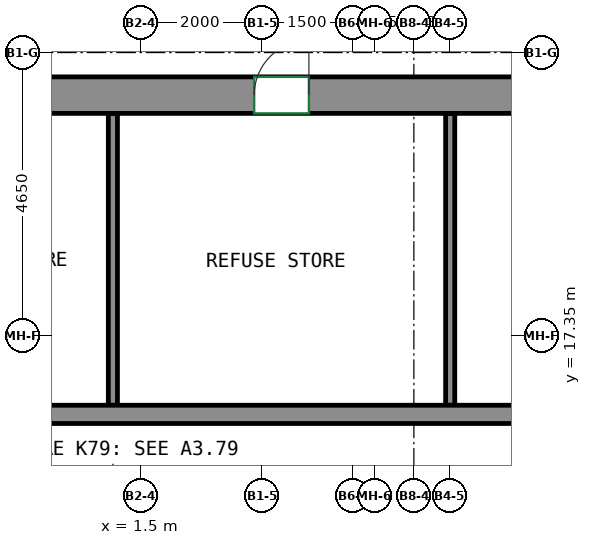
"""IFC4 building model, lengths in metres.
Left out: names, types, materials, properties, quantities, classifications, styles, units other than length and angle.
Written with IfcOpenShell. Run it as: python <this file> out.ifc"""

import sys

from ifc_helpers import new_model, si_unit, direction, frame, frame_2d, origin, place, context, subcontext, project, spatial, rectangle, extrude, source, transform, mapped, element, fill, save


model = new_model("IFC4")
c1 = context("Model", 3, precision=1e-05, world=origin(), true_north=direction((0.0, 1.0)))
c2 = subcontext(c1, "Body", "Model", "MODEL_VIEW")
j1 = project(units=[si_unit("LENGTHUNIT", "METRE"), si_unit("PLANEANGLEUNIT", "RADIAN")], contexts=[c1])
p1 = place(None, origin())
s1 = spatial("IfcSite", under=j1, at=p1, CompositionType="ELEMENT")
p2 = place(p1, origin())
s2 = spatial("IfcBuilding", under=s1, at=p2, CompositionType="ELEMENT")
p3 = place(p2, frame((0.0, 0.0, 312.0)))
s3 = spatial("IfcBuildingStorey", under=s2, at=p3, CompositionType="ELEMENT", Elevation=312.0)
m1 = source(origin(), c2, "Body", "SweptSolid", [
    extrude(rectangle(XDim=33.3, YDim=0.6, at=frame_2d((16.65, 0.0))), origin(), (0.0, 0.0, 1.0), 3.12),
])
p4 = place(p3, frame((-15.6, 21.3, 0.0), z_axis=(0.0, 0.0, 1.0), x_axis=(1.0, 0.0, 0.0)))
e1 = element("IfcWall", 1, at=p4, inside=s3, PredefinedType="SHEAR", context=c2, shape_type="MappedRepresentation", body=[
    mapped(m1, transform((0.0, 0.0, 0.0))),
])
p5 = place(p4, frame((8.12, 0.0, 0.0)))
e2 = element("IfcOpeningElement", 2, at=p5, cuts=e1, PredefinedType="OPENING", context=c2, shape_type="SweptSolid", body=[
    extrude(rectangle(XDim=0.9, YDim=2.1, at=frame_2d((0.45, 1.05))), frame((0.0, 0.31, 0.0), z_axis=(0.0, -1.0, 0.0), x_axis=(1.0, 0.0, 0.0)), (0.0, 0.0, 1.0), 0.62),
])
p6 = place(p4, frame((14.15, 0.0, 0.0)))
e3 = element("IfcOpeningElement", 3, at=p6, cuts=e1, PredefinedType="OPENING", context=c2, shape_type="SweptSolid", body=[
    extrude(rectangle(XDim=0.9, YDim=2.1, at=frame_2d((0.45, 1.05))), frame((0.0, 0.31, 0.0), z_axis=(0.0, -1.0, 0.0), x_axis=(1.0, 0.0, 0.0)), (0.0, 0.0, 1.0), 0.62),
])
p7 = place(p4, frame((18.974, 0.0, 0.0)))
e4 = element("IfcOpeningElement", 4, at=p7, cuts=e1, PredefinedType="OPENING", context=c2, shape_type="SweptSolid", body=[
    extrude(rectangle(XDim=0.9, YDim=2.1, at=frame_2d((0.45, 1.05))), frame((0.0, 0.31, 0.0), z_axis=(0.0, -1.0, 0.0), x_axis=(1.0, 0.0, 0.0)), (0.0, 0.0, 1.0), 0.62),
])
p8 = place(p4, frame((23.664, 0.0, 0.0)))
e5 = element("IfcOpeningElement", 5, at=p8, cuts=e1, PredefinedType="OPENING", context=c2, shape_type="SweptSolid", body=[
    extrude(rectangle(XDim=0.9, YDim=2.1, at=frame_2d((0.45, 1.05))), frame((0.0, 0.31, 0.0), z_axis=(0.0, -1.0, 0.0), x_axis=(1.0, 0.0, 0.0)), (0.0, 0.0, 1.0), 0.62),
])
p9 = place(p4, frame((26.92, 0.0, 0.0)))
e6 = element("IfcOpeningElement", 6, at=p9, cuts=e1, PredefinedType="OPENING", context=c2, shape_type="SweptSolid", body=[
    extrude(rectangle(XDim=0.9, YDim=2.1, at=frame_2d((0.45, 1.05))), frame((0.0, 0.31, 0.0), z_axis=(0.0, -1.0, 0.0), x_axis=(1.0, 0.0, 0.0)), (0.0, 0.0, 1.0), 0.62),
])
p10 = place(p4, frame((2.125, 0.0, 0.0)))
e7 = element("IfcOpeningElement", 7, at=p10, cuts=e1, PredefinedType="OPENING", context=c2, shape_type="SweptSolid", body=[
    extrude(rectangle(XDim=0.9, YDim=2.1, at=frame_2d((0.45, 1.05))), frame((0.0, 0.31, 0.0), z_axis=(0.0, -1.0, 0.0), x_axis=(1.0, 0.0, 0.0)), (0.0, 0.0, 1.0), 0.62),
])
p11 = place(p4, frame((30.275, 0.0, 0.0)))
e8 = element("IfcOpeningElement", 8, at=p11, cuts=e1, PredefinedType="OPENING", context=c2, shape_type="SweptSolid", body=[
    extrude(rectangle(XDim=0.9, YDim=2.1, at=frame_2d((0.45, 1.05))), frame((0.0, 0.31, 0.0), z_axis=(0.0, -1.0, 0.0), x_axis=(1.0, 0.0, 0.0)), (0.0, 0.0, 1.0), 0.62),
])
m2 = source(origin(), c2, "Body", "SweptSolid", [
    extrude(rectangle(XDim=22.08, YDim=0.3, at=frame_2d((11.04, 0.0))), origin(), (0.0, 0.0, 1.0), 3.12),
])
p12 = place(p3, frame((-11.01, 16.05, 0.0), z_axis=(0.0, 0.0, 1.0), x_axis=(1.0, 0.0, 0.0)))
e9 = element("IfcWall", 9, at=p12, inside=s3, PredefinedType="SHEAR", context=c2, shape_type="MappedRepresentation", body=[
    mapped(m2, transform((0.0, 0.0, 0.0))),
])
m3 = source(origin(), c2, "Body", "SweptSolid", [
    extrude(rectangle(XDim=4.8, YDim=0.15, at=frame_2d((2.4, 0.0))), origin(), (0.0, 0.0, 1.0), 3.12),
])
for number, where, z_axis, x_axis in (
    (10, (1.05, 16.2, 0.0), (0.0, 0.0, 1.0), (0.0, 1.0, 0.0)),
    (11, (6.598, 16.2, 0.0), (0.0, 0.0, 1.0), (0.0, 1.0, 0.0)),
):
    element("IfcWall", number, at=place(p3, frame(where, z_axis=z_axis, x_axis=x_axis)), inside=s3, PredefinedType="PARTITIONING", context=c2, shape_type="MappedRepresentation", body=[
        mapped(m3, transform((0.0, 0.0, 0.0))),
    ])
p13 = place(p7, origin())
e12 = element("IfcDoor", 12, at=p13, inside=s3, OperationType="SINGLE_SWING_RIGHT", PredefinedType="DOOR", context=c2, shape_type="SweptSolid", body=[
    extrude(rectangle(XDim=0.9, YDim=2.1, at=frame_2d((0.45, 1.05))), frame((0.0, -0.155, 0.0), z_axis=(0.0, -1.0, 0.0), x_axis=(1.0, 0.0, 0.0)), (0.0, 0.0, 1.0), 0.05),
])
fill(e4, e12)
save(model, sys.argv[1])
